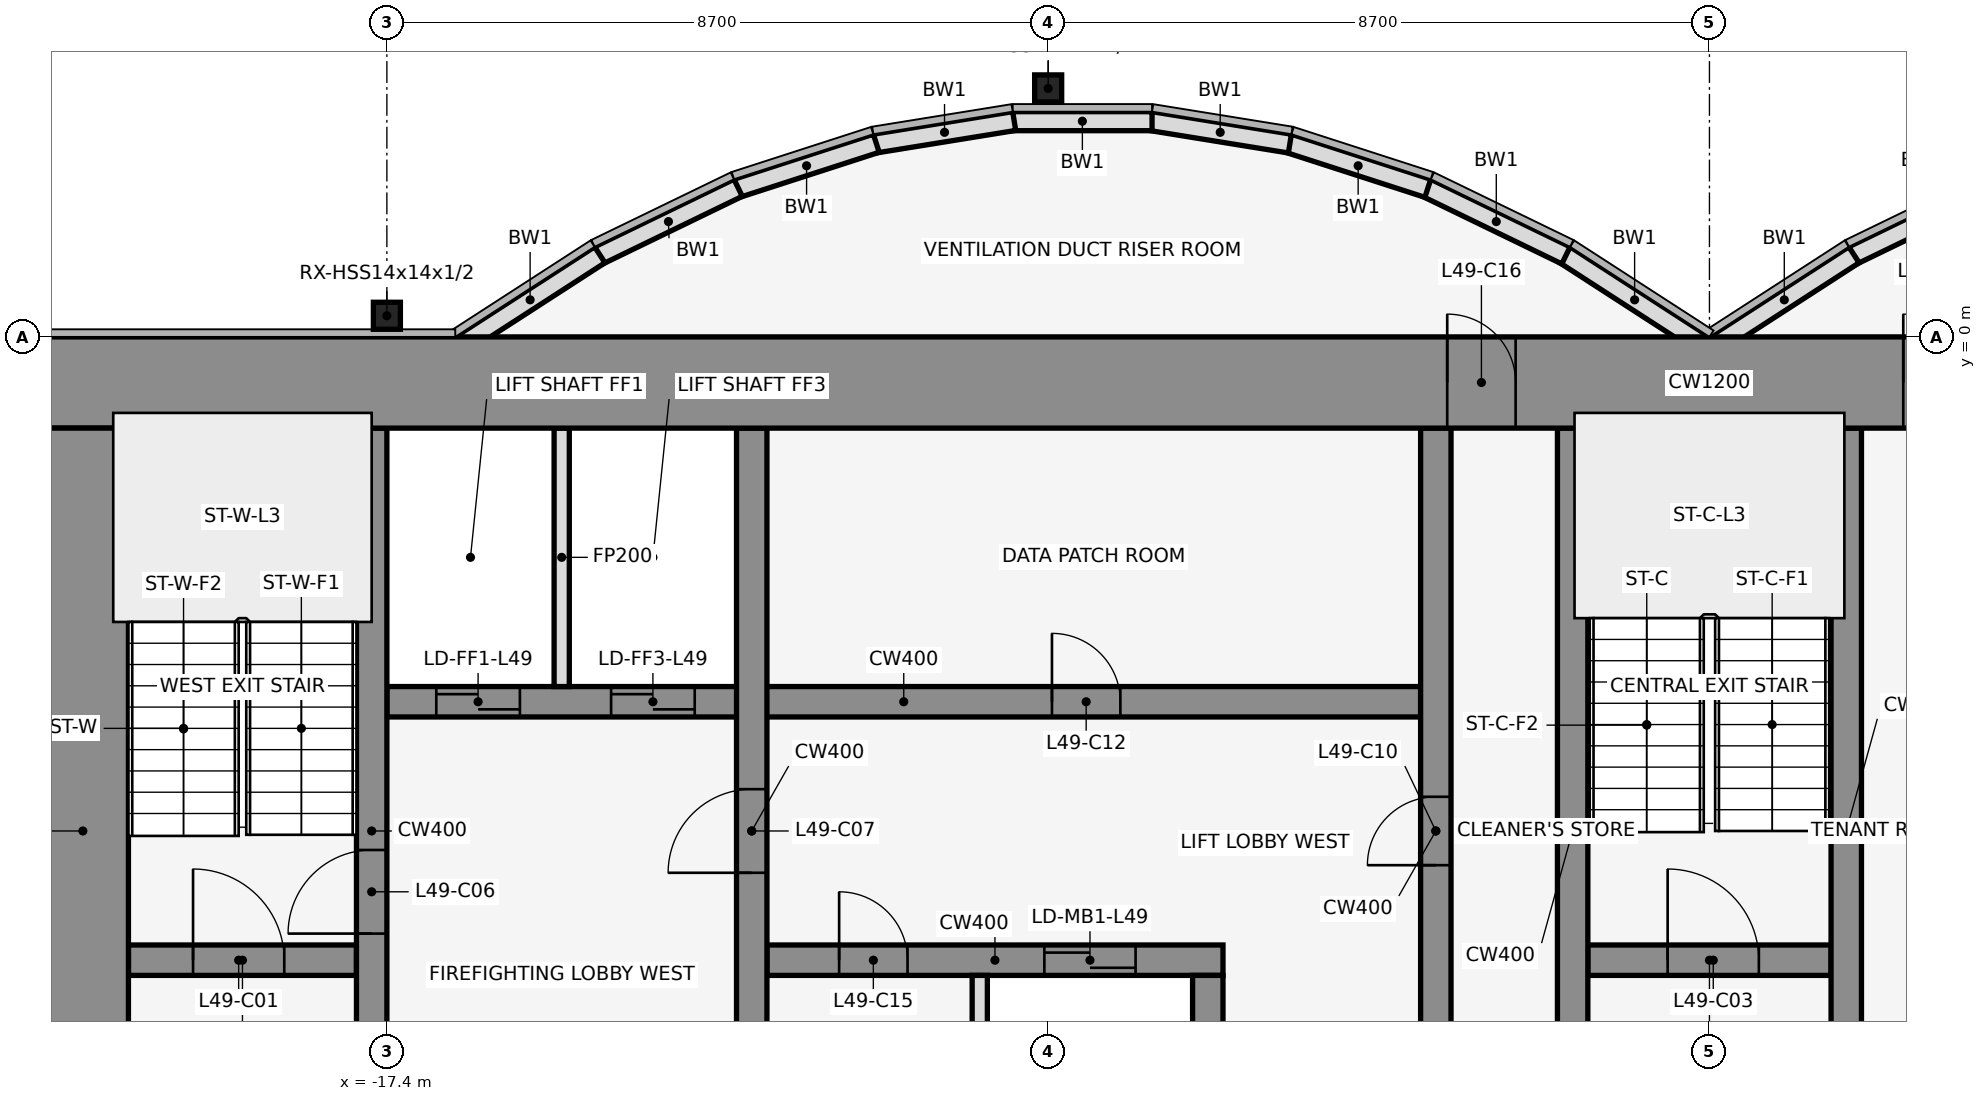
"""IFC4 building model, lengths in metres.
Left out: names, types, materials, properties, quantities, classifications, styles, units other than length and angle.
Written with IfcOpenShell. Run it as: python <this file> out.ifc"""

import sys

from ifc_helpers import new_model, si_unit, direction, frame, frame_2d, origin, origin_2d, place, context, subcontext, project, spatial, rectangle, hollow_rectangle, extrude, element, fill, save


model = new_model("IFC4")
c1 = context("Model", 3, precision=1e-05, world=origin(), true_north=direction((0.0, 1.0)))
c2 = subcontext(c1, "Body", "Model", "MODEL_VIEW")
j1 = project(units=[si_unit("LENGTHUNIT", "METRE"), si_unit("PLANEANGLEUNIT", "RADIAN")], contexts=[c1])
p1 = place(None, origin())
s1 = spatial("IfcSite", under=j1, at=p1, CompositionType="ELEMENT")
p2 = place(p1, origin())
s2 = spatial("IfcBuilding", under=s1, at=p2, CompositionType="ELEMENT")
p3 = place(p2, frame((0.0, 0.0, 219.6)))
s3 = spatial("IfcBuildingStorey", under=s2, at=p3, CompositionType="ELEMENT", Elevation=219.6)
for number, where, z_axis, x_axis in (
    (1, (-8.7, 3.269, 0.0), (0.0, 0.0, 1.0), (1.0, 0.0, 0.0)),
    (2, (-17.4, 0.278, 0.0), (0.0, 0.0, 1.0), (1.0, 0.0, 0.0)),
):
    element("IfcColumn", number, at=place(p3, frame(where, z_axis=z_axis, x_axis=x_axis)), inside=s3, PredefinedType="COLUMN", context=c2, shape_type="SweptSolid", body=[
        extrude(hollow_rectangle(XDim=0.356, YDim=0.356, WallThickness=0.012, at=origin_2d()), origin(), (0.0, 0.0, 1.0), 4.1),
    ])
p4 = place(p3, frame((3.721, 1.962, 0.0), z_axis=(0.0, 0.0, 1.0), x_axis=(-0.89982408427, -0.436252928206, 0.0)))
e3 = element("IfcWall", 3, at=p4, inside=s3, PredefinedType="STANDARD", context=c2, shape_type="SweptSolid", body=[
    extrude(rectangle(XDim=2.038, YDim=0.25, at=frame_2d((1.019, 0.0))), origin(), (0.0, 0.0, 1.0), 3.95),
])
for number, where, z_axis, x_axis in (
    (4, (1.901, 1.08, 0.0), (0.0, 0.0, 1.0), (-0.84, -0.543, 0.0)),
    (5, (-0.068, -0.105, 0.0), (0.0, 0.0, 1.0), (-0.84, 0.543, 0.0)),
):
    element("IfcWall", number, at=place(p3, frame(where, z_axis=z_axis, x_axis=x_axis)), inside=s3, PredefinedType="STANDARD", context=c2, shape_type="SweptSolid", body=[
        extrude(rectangle(XDim=2.183, YDim=0.25, at=frame_2d((1.091, 0.0))), origin(), (0.0, 0.0, 1.0), 3.95),
    ])
p5 = place(p3, frame((-1.888, 1.073, 0.0), z_axis=(0.0, 0.0, 1.0), x_axis=(-0.89982408427, 0.436252928206, 0.0)))
e6 = element("IfcWall", 6, at=p5, inside=s3, PredefinedType="STANDARD", context=c2, shape_type="SweptSolid", body=[
    extrude(rectangle(XDim=2.038, YDim=0.25, at=frame_2d((1.019, 0.0))), origin(), (0.0, 0.0, 1.0), 3.95),
])
p6 = place(p3, frame((-3.705, 1.955, 0.0), z_axis=(0.0, 0.0, 1.0), x_axis=(-0.951495806175, 0.307661714928, 0.0)))
e7 = element("IfcWall", 7, at=p6, inside=s3, PredefinedType="STANDARD", context=c2, shape_type="SweptSolid", body=[
    extrude(rectangle(XDim=1.927, YDim=0.25, at=frame_2d((0.963, 0.0))), origin(), (0.0, 0.0, 1.0), 3.95),
])
p7 = place(p3, frame((-5.52, 2.543, 0.0), z_axis=(0.0, 0.0, 1.0), x_axis=(-0.987181718931, 0.159600293885, 0.0)))
e8 = element("IfcWall", 8, at=p7, inside=s3, PredefinedType="STANDARD", context=c2, shape_type="SweptSolid", body=[
    extrude(rectangle(XDim=1.857, YDim=0.25, at=frame_2d((0.929, 0.0))), origin(), (0.0, 0.0, 1.0), 3.95),
])
p8 = place(p3, frame((-7.333, 2.838, 0.0), z_axis=(0.0, 0.0, 1.0), x_axis=(-1.0, 0.0, 0.0)))
e9 = element("IfcWall", 9, at=p8, inside=s3, PredefinedType="STANDARD", context=c2, shape_type="SweptSolid", body=[
    extrude(rectangle(XDim=1.833, YDim=0.25, at=frame_2d((0.917, 0.0))), origin(), (0.0, 0.0, 1.0), 3.95),
])
p9 = place(p3, frame((-9.147, 2.84, 0.0), z_axis=(0.0, 0.0, 1.0), x_axis=(-0.987181718931, -0.159600293885, 0.0)))
e10 = element("IfcWall", 10, at=p9, inside=s3, PredefinedType="STANDARD", context=c2, shape_type="SweptSolid", body=[
    extrude(rectangle(XDim=1.857, YDim=0.25, at=frame_2d((0.929, 0.0))), origin(), (0.0, 0.0, 1.0), 3.95),
])
p10 = place(p3, frame((-10.962, 2.548, 0.0), z_axis=(0.0, 0.0, 1.0), x_axis=(-0.951495806175, -0.307661714928, 0.0)))
e11 = element("IfcWall", 11, at=p10, inside=s3, PredefinedType="STANDARD", context=c2, shape_type="SweptSolid", body=[
    extrude(rectangle(XDim=1.927, YDim=0.25, at=frame_2d((0.963, 0.0))), origin(), (0.0, 0.0, 1.0), 3.95),
])
p11 = place(p3, frame((-12.779, 1.962, 0.0), z_axis=(0.0, 0.0, 1.0), x_axis=(-0.89982408427, -0.436252928206, 0.0)))
e12 = element("IfcWall", 12, at=p11, inside=s3, PredefinedType="STANDARD", context=c2, shape_type="SweptSolid", body=[
    extrude(rectangle(XDim=2.038, YDim=0.25, at=frame_2d((1.019, 0.0))), origin(), (0.0, 0.0, 1.0), 3.95),
])
p12 = place(p3, frame((-14.599, 1.08, 0.0), z_axis=(0.0, 0.0, 1.0), x_axis=(-0.83981312244, -0.542875602121, 0.0)))
e13 = element("IfcWall", 13, at=p12, inside=s3, PredefinedType="STANDARD", context=c2, shape_type="SweptSolid", body=[
    extrude(rectangle(XDim=2.183, YDim=0.25, at=frame_2d((1.091, 0.0))), origin(), (0.0, 0.0, 1.0), 3.95),
])
p13 = place(p3, frame((-20.8, -8.2, 0.0), z_axis=(0.0, 0.0, 1.0), x_axis=(1.0, 0.0, 0.0)))
e14 = element("IfcWall", 14, at=p13, inside=s3, PredefinedType="SHEAR", context=c2, shape_type="SweptSolid", body=[
    extrude(rectangle(XDim=3.0, YDim=0.4, at=frame_2d((1.5, 0.0))), origin(), (0.0, 0.0, 1.0), 4.1),
])
p14 = place(p13, frame((0.85, 0.0, 0.0)))
e15 = element("IfcOpeningElement", 15, at=p14, cuts=e14, PredefinedType="OPENING", context=c2, shape_type="SweptSolid", body=[
    extrude(rectangle(XDim=1.2, YDim=2.1, at=frame_2d((0.6, 1.05))), frame((0.0, 0.212, 0.0), z_axis=(0.0, -1.0, 0.0), x_axis=(1.0, 0.0, 0.0)), (0.0, 0.0, 1.0), 0.424),
])
p15 = place(p3, frame((-12.4, -8.2, 0.0), z_axis=(0.0, 0.0, 1.0), x_axis=(1.0, 0.0, 0.0)))
e16 = element("IfcWall", 16, at=p15, inside=s3, PredefinedType="SHEAR", context=c2, shape_type="SweptSolid", body=[
    extrude(rectangle(XDim=6.0, YDim=0.4, at=frame_2d((3.0, 0.0))), origin(), (0.0, 0.0, 1.0), 4.1),
])
p16 = place(p15, frame((3.65, 0.0, 0.0)))
e17 = element("IfcOpeningElement", 17, at=p16, cuts=e16, PredefinedType="OPENING", context=c2, shape_type="SweptSolid", body=[
    extrude(rectangle(XDim=1.2, YDim=2.1, at=frame_2d((0.6, 1.05))), frame((0.0, 0.212, 0.0), z_axis=(0.0, -1.0, 0.0), x_axis=(1.0, 0.0, 0.0)), (0.0, 0.0, 1.0), 0.424),
])
p17 = place(p15, frame((0.95, 0.0, 0.0)))
e18 = element("IfcOpeningElement", 18, at=p17, cuts=e16, PredefinedType="OPENING", context=c2, shape_type="SweptSolid", body=[
    extrude(rectangle(XDim=0.9, YDim=2.1, at=frame_2d((0.45, 1.05))), frame((0.0, 0.212, 0.0), z_axis=(0.0, -1.0, 0.0), x_axis=(1.0, 0.0, 0.0)), (0.0, 0.0, 1.0), 0.424),
])
p18 = place(p3, frame((-1.6, -8.2, 0.0), z_axis=(0.0, 0.0, 1.0), x_axis=(1.0, 0.0, 0.0)))
e19 = element("IfcWall", 19, at=p18, inside=s3, PredefinedType="SHEAR", context=c2, shape_type="SweptSolid", body=[
    extrude(rectangle(XDim=3.2, YDim=0.4, at=frame_2d((1.6, 0.0))), origin(), (0.0, 0.0, 1.0), 4.1),
])
p19 = place(p18, frame((1.05, 0.0, 0.0)))
e20 = element("IfcOpeningElement", 20, at=p19, cuts=e19, PredefinedType="OPENING", context=c2, shape_type="SweptSolid", body=[
    extrude(rectangle(XDim=1.2, YDim=2.1, at=frame_2d((0.6, 1.05))), frame((0.0, 0.212, 0.0), z_axis=(0.0, -1.0, 0.0), x_axis=(1.0, 0.0, 0.0)), (0.0, 0.0, 1.0), 0.424),
])
p20 = place(p3, frame((-17.4, -4.8, 0.0), z_axis=(0.0, 0.0, 1.0), x_axis=(1.0, 0.0, 0.0)))
e21 = element("IfcWall", 21, at=p20, inside=s3, PredefinedType="SHEAR", context=c2, shape_type="SweptSolid", body=[
    extrude(rectangle(XDim=13.6, YDim=0.4, at=frame_2d((6.8, 0.0))), origin(), (0.0, 0.0, 1.0), 4.1),
])
p21 = place(p20, frame((0.65, 0.0, 0.0)))
e22 = element("IfcOpeningElement", 22, at=p21, cuts=e21, PredefinedType="OPENING", context=c2, shape_type="SweptSolid", body=[
    extrude(rectangle(XDim=1.1, YDim=2.1, at=frame_2d((0.55, 1.05))), frame((0.0, 0.212, 0.0), z_axis=(0.0, -1.0, 0.0), x_axis=(1.0, 0.0, 0.0)), (0.0, 0.0, 1.0), 0.424),
])
p22 = place(p20, frame((2.95, 0.0, 0.0)))
e23 = element("IfcOpeningElement", 23, at=p22, cuts=e21, PredefinedType="OPENING", context=c2, shape_type="SweptSolid", body=[
    extrude(rectangle(XDim=1.1, YDim=2.1, at=frame_2d((0.55, 1.05))), frame((0.0, 0.212, 0.0), z_axis=(0.0, -1.0, 0.0), x_axis=(1.0, 0.0, 0.0)), (0.0, 0.0, 1.0), 0.424),
])
p23 = place(p20, frame((8.75, 0.0, 0.0)))
e24 = element("IfcOpeningElement", 24, at=p23, cuts=e21, PredefinedType="OPENING", context=c2, shape_type="SweptSolid", body=[
    extrude(rectangle(XDim=0.9, YDim=2.1, at=frame_2d((0.45, 1.05))), frame((0.0, 0.212, 0.0), z_axis=(0.0, -1.0, 0.0), x_axis=(1.0, 0.0, 0.0)), (0.0, 0.0, 1.0), 0.424),
])
p24 = place(p3, frame((-17.6, -11.8, 0.0), z_axis=(0.0, 0.0, 1.0), x_axis=(0.0, 1.0, 0.0)))
e25 = element("IfcWall", 25, at=p24, inside=s3, PredefinedType="SHEAR", context=c2, shape_type="SweptSolid", body=[
    extrude(rectangle(XDim=10.6, YDim=0.4, at=frame_2d((5.3, 0.0))), origin(), (0.0, 0.0, 1.0), 4.1),
])
p25 = place(p24, frame((1.25, 0.0, 0.0)))
e26 = element("IfcOpeningElement", 26, at=p25, cuts=e25, PredefinedType="OPENING", context=c2, shape_type="SweptSolid", body=[
    extrude(rectangle(XDim=1.1, YDim=2.1, at=frame_2d((0.55, 1.05))), frame((0.0, 0.212, 0.0), z_axis=(0.0, -1.0, 0.0), x_axis=(1.0, 0.0, 0.0)), (0.0, 0.0, 1.0), 0.424),
])
p26 = place(p24, frame((3.95, 0.0, 0.0)))
e27 = element("IfcOpeningElement", 27, at=p26, cuts=e25, PredefinedType="OPENING", context=c2, shape_type="SweptSolid", body=[
    extrude(rectangle(XDim=1.1, YDim=2.1, at=frame_2d((0.55, 1.05))), frame((0.0, 0.212, 0.0), z_axis=(0.0, -1.0, 0.0), x_axis=(1.0, 0.0, 0.0)), (0.0, 0.0, 1.0), 0.424),
])
p27 = place(p3, frame((-15.1, -4.6, 0.0), z_axis=(0.0, 0.0, 1.0), x_axis=(0.0, 1.0, 0.0)))
e28 = element("IfcWall", 28, at=p27, inside=s3, PredefinedType="PARTITIONING", context=c2, shape_type="SweptSolid", body=[
    extrude(rectangle(XDim=3.4, YDim=0.2, at=frame_2d((1.7, 0.0))), origin(), (0.0, 0.0, 1.0), 2.84),
])
p28 = place(p3, frame((-12.6, -11.8, 0.0), z_axis=(0.0, 0.0, 1.0), x_axis=(0.0, 1.0, 0.0)))
e29 = element("IfcWall", 29, at=p28, inside=s3, PredefinedType="SHEAR", context=c2, shape_type="SweptSolid", body=[
    extrude(rectangle(XDim=10.6, YDim=0.4, at=frame_2d((5.3, 0.0))), origin(), (0.0, 0.0, 1.0), 4.1),
])
p29 = place(p28, frame((4.75, 0.0, 0.0)))
e30 = element("IfcOpeningElement", 30, at=p29, cuts=e29, PredefinedType="OPENING", context=c2, shape_type="SweptSolid", body=[
    extrude(rectangle(XDim=1.1, YDim=2.1, at=frame_2d((0.55, 1.05))), frame((0.0, 0.212, 0.0), z_axis=(0.0, -1.0, 0.0), x_axis=(1.0, 0.0, 0.0)), (0.0, 0.0, 1.0), 0.424),
])
p30 = place(p3, frame((-9.6, -11.8, 0.0), z_axis=(0.0, 0.0, 1.0), x_axis=(0.0, 1.0, 0.0)))
e31 = element("IfcWall", 31, at=p30, inside=s3, PredefinedType="PARTITIONING", context=c2, shape_type="SweptSolid", body=[
    extrude(rectangle(XDim=3.4, YDim=0.2, at=frame_2d((1.7, 0.0))), origin(), (0.0, 0.0, 1.0), 2.84),
])
p31 = place(p3, frame((-6.6, -11.8, 0.0), z_axis=(0.0, 0.0, 1.0), x_axis=(0.0, 1.0, 0.0)))
e32 = element("IfcWall", 32, at=p31, inside=s3, PredefinedType="SHEAR", context=c2, shape_type="SweptSolid", body=[
    extrude(rectangle(XDim=3.4, YDim=0.4, at=frame_2d((1.7, 0.0))), origin(), (0.0, 0.0, 1.0), 4.1),
])
p32 = place(p3, frame((-3.6, -11.8, 0.0), z_axis=(0.0, 0.0, 1.0), x_axis=(0.0, 1.0, 0.0)))
e33 = element("IfcWall", 33, at=p32, inside=s3, PredefinedType="SHEAR", context=c2, shape_type="SweptSolid", body=[
    extrude(rectangle(XDim=10.6, YDim=0.4, at=frame_2d((5.3, 0.0))), origin(), (0.0, 0.0, 1.0), 4.1),
])
p33 = place(p32, frame((4.85, 0.0, 0.0)))
e34 = element("IfcOpeningElement", 34, at=p33, cuts=e33, PredefinedType="OPENING", context=c2, shape_type="SweptSolid", body=[
    extrude(rectangle(XDim=0.9, YDim=2.1, at=frame_2d((0.45, 1.05))), frame((0.0, 0.212, 0.0), z_axis=(0.0, -1.0, 0.0), x_axis=(1.0, 0.0, 0.0)), (0.0, 0.0, 1.0), 0.424),
])
for number, where, z_axis, x_axis in (
    (35, (-1.8, -11.8, 0.0), (0.0, 0.0, 1.0), (0.0, 1.0, 0.0)),
    (36, (1.8, -11.8, 0.0), (0.0, 0.0, 1.0), (0.0, 1.0, 0.0)),
):
    element("IfcWall", number, at=place(p3, frame(where, z_axis=z_axis, x_axis=x_axis)), inside=s3, PredefinedType="SHEAR", context=c2, shape_type="SweptSolid", body=[
        extrude(rectangle(XDim=10.6, YDim=0.4, at=frame_2d((5.3, 0.0))), origin(), (0.0, 0.0, 1.0), 4.1),
    ])
p34 = place(p3, frame((-22.0, -0.6, 0.0), z_axis=(0.0, 0.0, 1.0), x_axis=(1.0, 0.0, 0.0)))
e37 = element("IfcWall", 37, at=p34, inside=s3, PredefinedType="SHEAR", context=c2, shape_type="SweptSolid", body=[
    extrude(rectangle(XDim=44.0, YDim=1.2, at=frame_2d((22.0, 0.0))), origin(), (0.0, 0.0, 1.0), 4.1),
])
p35 = place(p34, frame((18.55, 0.0, 0.0)))
e38 = element("IfcOpeningElement", 38, at=p35, cuts=e37, PredefinedType="OPENING", context=c2, shape_type="SweptSolid", body=[
    extrude(rectangle(XDim=0.9, YDim=2.1, at=frame_2d((0.45, 1.05))), frame((0.0, 0.612, 0.0), z_axis=(0.0, -1.0, 0.0), x_axis=(1.0, 0.0, 0.0)), (0.0, 0.0, 1.0), 1.224),
])
p36 = place(p34, frame((24.55, 0.0, 0.0)))
e39 = element("IfcOpeningElement", 39, at=p36, cuts=e37, PredefinedType="OPENING", context=c2, shape_type="SweptSolid", body=[
    extrude(rectangle(XDim=0.9, YDim=2.1, at=frame_2d((0.45, 1.05))), frame((0.0, 0.612, 0.0), z_axis=(0.0, -1.0, 0.0), x_axis=(1.0, 0.0, 0.0)), (0.0, 0.0, 1.0), 1.224),
])
p37 = place(p3, frame((-21.4, -11.8, 0.0), z_axis=(0.0, 0.0, 1.0), x_axis=(0.0, 1.0, 0.0)))
e40 = element("IfcWall", 40, at=p37, inside=s3, PredefinedType="SHEAR", context=c2, shape_type="SweptSolid", body=[
    extrude(rectangle(XDim=10.6, YDim=1.2, at=frame_2d((5.3, 0.0))), origin(), (0.0, 0.0, 1.0), 4.1),
])
p38 = place(p14, origin())
e41 = element("IfcDoor", 41, at=p38, inside=s3, OperationType="SINGLE_SWING_LEFT", PredefinedType="DOOR", context=c2, shape_type="SweptSolid", body=[
    extrude(rectangle(XDim=1.2, YDim=2.1, at=frame_2d((0.6, 1.05))), frame((0.0, 0.025, 0.0), z_axis=(0.0, -1.0, 0.0), x_axis=(1.0, 0.0, 0.0)), (0.0, 0.0, 1.0), 0.05),
])
fill(e15, e41)
p39 = place(p19, origin())
e42 = element("IfcDoor", 42, at=p39, inside=s3, OperationType="SINGLE_SWING_LEFT", PredefinedType="DOOR", context=c2, shape_type="SweptSolid", body=[
    extrude(rectangle(XDim=1.2, YDim=2.1, at=frame_2d((0.6, 1.05))), frame((0.0, 0.025, 0.0), z_axis=(0.0, -1.0, 0.0), x_axis=(1.0, 0.0, 0.0)), (0.0, 0.0, 1.0), 0.05),
])
fill(e20, e42)
p40 = place(p21, origin())
e43 = element("IfcDoor", 43, at=p40, inside=s3, OperationType="DOUBLE_DOOR_SLIDING", PredefinedType="DOOR", context=c2, shape_type="SweptSolid", body=[
    extrude(rectangle(XDim=1.1, YDim=2.1, at=frame_2d((0.55, 1.05))), frame((0.0, 0.025, 0.0), z_axis=(0.0, -1.0, 0.0), x_axis=(1.0, 0.0, 0.0)), (0.0, 0.0, 1.0), 0.05),
])
fill(e22, e43)
p41 = place(p22, origin())
e44 = element("IfcDoor", 44, at=p41, inside=s3, OperationType="DOUBLE_DOOR_SLIDING", PredefinedType="DOOR", context=c2, shape_type="SweptSolid", body=[
    extrude(rectangle(XDim=1.1, YDim=2.1, at=frame_2d((0.55, 1.05))), frame((0.0, 0.025, 0.0), z_axis=(0.0, -1.0, 0.0), x_axis=(1.0, 0.0, 0.0)), (0.0, 0.0, 1.0), 0.05),
])
fill(e23, e44)
p42 = place(p16, origin())
e45 = element("IfcDoor", 45, at=p42, inside=s3, OperationType="DOUBLE_DOOR_SLIDING", PredefinedType="DOOR", context=c2, shape_type="SweptSolid", body=[
    extrude(rectangle(XDim=1.2, YDim=2.1, at=frame_2d((0.6, 1.05))), frame((0.0, 0.025, 0.0), z_axis=(0.0, -1.0, 0.0), x_axis=(1.0, 0.0, 0.0)), (0.0, 0.0, 1.0), 0.05),
])
fill(e17, e45)
p43 = place(p26, frame((1.1, 0.0, 0.0), z_axis=(0.0, 0.0, 1.0), x_axis=(-1.0, 0.0, 0.0)))
e46 = element("IfcDoor", 46, at=p43, inside=s3, OperationType="SINGLE_SWING_LEFT", PredefinedType="DOOR", context=c2, shape_type="SweptSolid", body=[
    extrude(rectangle(XDim=1.1, YDim=2.1, at=frame_2d((0.55, 1.05))), frame((0.0, 0.025, 0.0), z_axis=(0.0, -1.0, 0.0), x_axis=(1.0, 0.0, 0.0)), (0.0, 0.0, 1.0), 0.05),
])
fill(e27, e46)
p44 = place(p29, origin())
e47 = element("IfcDoor", 47, at=p44, inside=s3, OperationType="SINGLE_SWING_LEFT", PredefinedType="DOOR", context=c2, shape_type="SweptSolid", body=[
    extrude(rectangle(XDim=1.1, YDim=2.1, at=frame_2d((0.55, 1.05))), frame((0.0, 0.025, 0.0), z_axis=(0.0, -1.0, 0.0), x_axis=(1.0, 0.0, 0.0)), (0.0, 0.0, 1.0), 0.05),
])
fill(e30, e47)
p45 = place(p33, frame((0.9, 0.0, 0.0), z_axis=(0.0, 0.0, 1.0), x_axis=(-1.0, 0.0, 0.0)))
e48 = element("IfcDoor", 48, at=p45, inside=s3, OperationType="SINGLE_SWING_LEFT", PredefinedType="DOOR", context=c2, shape_type="SweptSolid", body=[
    extrude(rectangle(XDim=0.9, YDim=2.1, at=frame_2d((0.45, 1.05))), frame((0.0, 0.025, 0.0), z_axis=(0.0, -1.0, 0.0), x_axis=(1.0, 0.0, 0.0)), (0.0, 0.0, 1.0), 0.05),
])
fill(e34, e48)
p46 = place(p23, origin())
e49 = element("IfcDoor", 49, at=p46, inside=s3, OperationType="SINGLE_SWING_RIGHT", PredefinedType="DOOR", context=c2, shape_type="SweptSolid", body=[
    extrude(rectangle(XDim=0.9, YDim=2.1, at=frame_2d((0.45, 1.05))), frame((0.0, 0.025, 0.0), z_axis=(0.0, -1.0, 0.0), x_axis=(1.0, 0.0, 0.0)), (0.0, 0.0, 1.0), 0.05),
])
fill(e24, e49)
p47 = place(p17, frame((0.9, 0.0, 0.0), z_axis=(0.0, 0.0, 1.0), x_axis=(-1.0, 0.0, 0.0)))
e50 = element("IfcDoor", 50, at=p47, inside=s3, OperationType="SINGLE_SWING_RIGHT", PredefinedType="DOOR", context=c2, shape_type="SweptSolid", body=[
    extrude(rectangle(XDim=0.9, YDim=2.1, at=frame_2d((0.45, 1.05))), frame((0.0, 0.025, 0.0), z_axis=(0.0, -1.0, 0.0), x_axis=(1.0, 0.0, 0.0)), (0.0, 0.0, 1.0), 0.05),
])
fill(e18, e50)
p48 = place(p35, origin())
e51 = element("IfcDoor", 51, at=p48, inside=s3, OperationType="SINGLE_SWING_LEFT", PredefinedType="DOOR", context=c2, shape_type="SweptSolid", body=[
    extrude(rectangle(XDim=0.9, YDim=2.1, at=frame_2d((0.45, 1.05))), frame((0.0, 0.025, 0.0), z_axis=(0.0, -1.0, 0.0), x_axis=(1.0, 0.0, 0.0)), (0.0, 0.0, 1.0), 0.05),
])
fill(e38, e51)
p49 = place(p36, origin())
e52 = element("IfcDoor", 52, at=p49, inside=s3, OperationType="SINGLE_SWING_LEFT", PredefinedType="DOOR", context=c2, shape_type="SweptSolid", body=[
    extrude(rectangle(XDim=0.9, YDim=2.1, at=frame_2d((0.45, 1.05))), frame((0.0, 0.025, 0.0), z_axis=(0.0, -1.0, 0.0), x_axis=(1.0, 0.0, 0.0)), (0.0, 0.0, 1.0), 0.05),
])
fill(e39, e52)
save(model, sys.argv[1])
